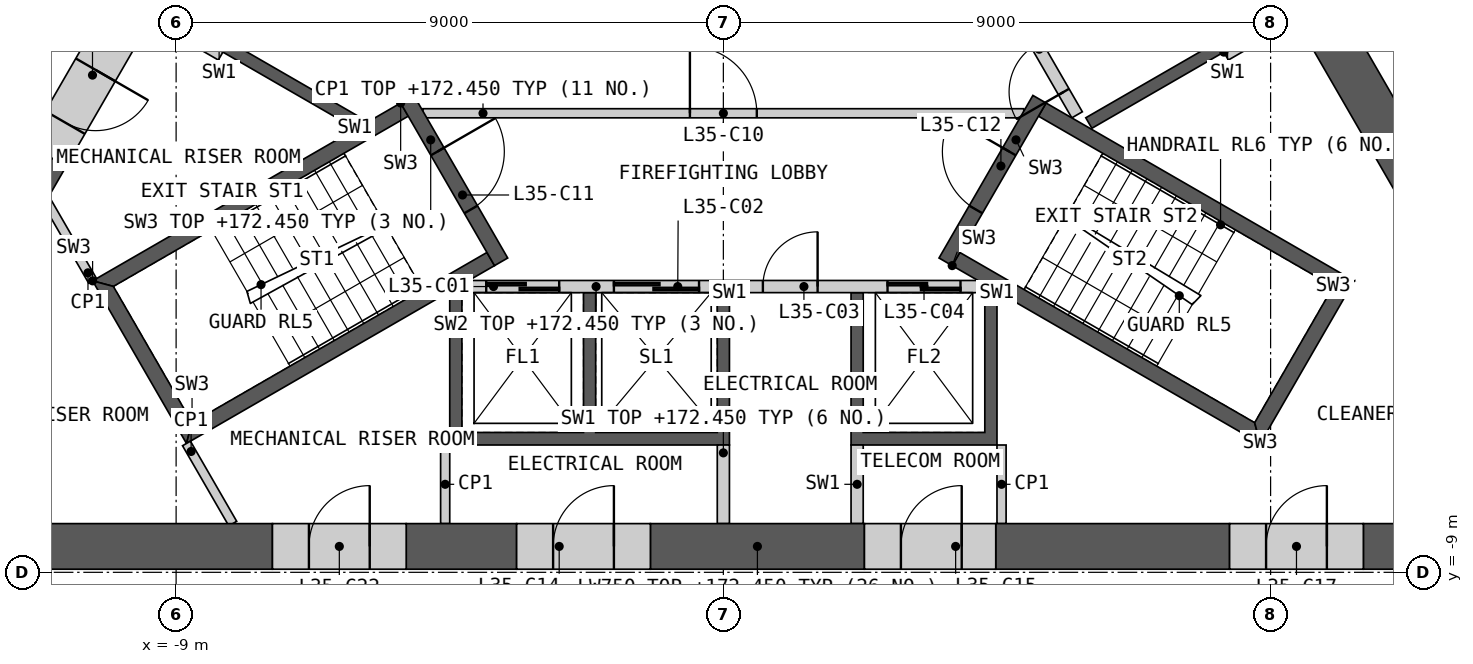
"""IFC4 building model, lengths in metres.
Left out: names, types, materials, properties, quantities, classifications, styles, units other than length and angle.
Written with IfcOpenShell. Run it as: python <this file> out.ifc"""

import sys

from ifc_helpers import new_model, si_unit, direction, frame, frame_2d, origin, place, context, subcontext, project, spatial, polyline, rectangle, outline, extrude, element, fill, save


model = new_model("IFC4")
c1 = context("Model", 3, precision=1e-05, world=origin(), true_north=direction((0.0, 1.0)))
c2 = subcontext(c1, "Body", "Model", "MODEL_VIEW")
j1 = project(units=[si_unit("LENGTHUNIT", "METRE"), si_unit("PLANEANGLEUNIT", "RADIAN")], contexts=[c1])
p1 = place(None, origin())
s1 = spatial("IfcSite", under=j1, at=p1, CompositionType="ELEMENT")
p2 = place(p1, origin())
s2 = spatial("IfcBuilding", under=s1, at=p2, CompositionType="ELEMENT")
p3 = place(p2, frame((0.0, 0.0, 169.2)))
s3 = spatial("IfcBuildingStorey", under=s2, at=p3, CompositionType="ELEMENT", Elevation=169.2)
p4 = place(p3, origin())
e1 = element("IfcWall", 1, at=p4, inside=s3, PredefinedType="SHEAR", context=c2, shape_type="SweptSolid", body=[
    extrude(outline(polyline([(4.5, -4.4), (4.5, -6.906), (2.1, -6.906), (2.1, -4.4), (2.3, -4.4), (2.3, -6.7), (4.3, -6.7), (4.3, -4.4), (4.5, -4.4)])), origin(), (0.0, 0.0, 1.0), 3.25),
])
p5 = place(p3, origin())
e2 = element("IfcWall", 2, at=p5, inside=s3, PredefinedType="SHEAR", context=c2, shape_type="SweptSolid", body=[
    extrude(outline(polyline([(0.1, -4.4), (0.1, -6.906), (-4.5, -6.906), (-4.5, -4.4), (-4.3, -4.4), (-4.3, -6.7), (-2.3, -6.7), (-2.3, -4.4), (-2.1, -4.4), (-2.1, -6.7), (-0.1, -6.7), (-0.1, -4.4), (0.1, -4.4)])), origin(), (0.0, 0.0, 1.0), 3.25),
])
p6 = place(p3, frame((-4.187, -4.3, 0.0), z_axis=(0.0, 0.0, 1.0), x_axis=(1.0, 0.0, 0.0)))
e3 = element("IfcWall", 3, at=p6, inside=s3, PredefinedType="SOLIDWALL", context=c2, shape_type="SweptSolid", body=[
    extrude(rectangle(XDim=8.373, YDim=0.2, at=frame_2d((4.187, 0.0))), origin(), (0.0, 0.0, 1.0), 3.25),
])
p7 = place(p6, frame((0.287, 0.0, 0.0)))
e4 = element("IfcOpeningElement", 4, at=p7, cuts=e3, PredefinedType="OPENING", context=c2, shape_type="SweptSolid", body=[
    extrude(rectangle(XDim=1.2, YDim=2.1, at=frame_2d((0.6, 1.05))), frame((0.0, 0.11, 0.0), z_axis=(0.0, -1.0, 0.0), x_axis=(1.0, 0.0, 0.0)), (0.0, 0.0, 1.0), 0.22),
])
p8 = place(p6, frame((2.387, 0.0, 0.0)))
e5 = element("IfcOpeningElement", 5, at=p8, cuts=e3, PredefinedType="OPENING", context=c2, shape_type="SweptSolid", body=[
    extrude(rectangle(XDim=1.4, YDim=2.1, at=frame_2d((0.7, 1.05))), frame((0.0, 0.11, 0.0), z_axis=(0.0, -1.0, 0.0), x_axis=(1.0, 0.0, 0.0)), (0.0, 0.0, 1.0), 0.22),
])
p9 = place(p6, frame((4.837, 0.0, 0.0)))
e6 = element("IfcOpeningElement", 6, at=p9, cuts=e3, PredefinedType="OPENING", context=c2, shape_type="SweptSolid", body=[
    extrude(rectangle(XDim=0.9, YDim=2.1, at=frame_2d((0.45, 1.05))), frame((0.0, 0.11, 0.0), z_axis=(0.0, -1.0, 0.0), x_axis=(1.0, 0.0, 0.0)), (0.0, 0.0, 1.0), 0.22),
])
p10 = place(p6, frame((6.887, 0.0, 0.0)))
e7 = element("IfcOpeningElement", 7, at=p10, cuts=e3, PredefinedType="OPENING", context=c2, shape_type="SweptSolid", body=[
    extrude(rectangle(XDim=1.2, YDim=2.1, at=frame_2d((0.6, 1.05))), frame((0.0, 0.11, 0.0), z_axis=(0.0, -1.0, 0.0), x_axis=(1.0, 0.0, 0.0)), (0.0, 0.0, 1.0), 0.22),
])
for number, where, z_axis, x_axis in (
    (8, (0.0, -6.906, 0.0), (0.0, 0.0, 1.0), (0.0, -1.0, 0.0)),
    (9, (2.2, -6.906, 0.0), (0.0, 0.0, 1.0), (0.0, -1.0, 0.0)),
):
    element("IfcWall", number, at=place(p3, frame(where, z_axis=z_axis, x_axis=x_axis)), inside=s3, PredefinedType="SHEAR", context=c2, shape_type="SweptSolid", body=[
        extrude(rectangle(XDim=1.293, YDim=0.2, at=frame_2d((0.646, 0.0))), origin(), (0.0, 0.0, 1.0), 3.25),
    ])
p11 = place(p3, origin())
e10 = element("IfcWall", 10, at=p11, inside=s3, PredefinedType="SHEAR", context=c2, shape_type="SweptSolid", body=[
    extrude(outline(polyline([(8.231, -0.444), (6.061, -1.697), (5.96, -1.524), (8.131, -0.271), (8.231, -0.444)])), origin(), (0.0, 0.0, 1.0), 3.25),
])
p12 = place(p3, frame((5.817, -1.476, 0.0), z_axis=(0.0, 0.0, 1.0), x_axis=(-0.500002616675, 0.866023893041, 0.0)))
e11 = element("IfcWall", 11, at=p12, inside=s3, PredefinedType="SOLIDWALL", context=c2, shape_type="SweptSolid", body=[
    extrude(rectangle(XDim=8.373, YDim=0.2, at=frame_2d((4.187, 0.0))), origin(), (0.0, 0.0, 1.0), 3.25),
])
p13 = place(p12, frame((0.437, 0.0, 0.0)))
e12 = element("IfcOpeningElement", 12, at=p13, cuts=e11, PredefinedType="OPENING", context=c2, shape_type="SweptSolid", body=[
    extrude(rectangle(XDim=0.9, YDim=2.1, at=frame_2d((0.45, 1.05))), frame((0.0, 0.11, 0.0), z_axis=(0.0, -1.0, 0.0), x_axis=(1.0, 0.0, 0.0)), (0.0, 0.0, 1.0), 0.22),
])
p14 = place(p12, frame((3.737, 0.0, 0.0)))
e13 = element("IfcOpeningElement", 13, at=p14, cuts=e11, PredefinedType="OPENING", context=c2, shape_type="SweptSolid", body=[
    extrude(rectangle(XDim=0.9, YDim=2.1, at=frame_2d((0.45, 1.05))), frame((0.0, 0.11, 0.0), z_axis=(0.0, -1.0, 0.0), x_axis=(1.0, 0.0, 0.0)), (0.0, 0.0, 1.0), 0.22),
])
p15 = place(p12, frame((6.937, 0.0, 0.0)))
e14 = element("IfcOpeningElement", 14, at=p15, cuts=e11, PredefinedType="OPENING", context=c2, shape_type="SweptSolid", body=[
    extrude(rectangle(XDim=1.1, YDim=2.1, at=frame_2d((0.55, 1.05))), frame((0.0, 0.11, 0.0), z_axis=(0.0, -1.0, 0.0), x_axis=(1.0, 0.0, 0.0)), (0.0, 0.0, 1.0), 0.22),
])
p16 = place(p3, origin())
e15 = element("IfcWall", 15, at=p16, inside=s3, PredefinedType="SHEAR", context=c2, shape_type="SweptSolid", body=[
    extrude(outline(polyline([(-6.061, -1.697), (-8.231, -0.444), (-8.131, -0.271), (-5.96, -1.524), (-6.061, -1.697)])), origin(), (0.0, 0.0, 1.0), 3.25),
])
p17 = place(p3, frame((-4.941, -1.45, 0.0), z_axis=(0.0, 0.0, 1.0), x_axis=(1.0, 0.0, 0.0)))
e16 = element("IfcWall", 16, at=p17, inside=s3, PredefinedType="PARTITIONING", context=c2, shape_type="SweptSolid", body=[
    extrude(rectangle(XDim=9.882, YDim=0.15, at=frame_2d((4.941, 0.0))), origin(), (0.0, 0.0, 1.0), 3.25),
])
p18 = place(p17, frame((4.391, 0.0, 0.0)))
e17 = element("IfcOpeningElement", 17, at=p18, cuts=e16, PredefinedType="OPENING", context=c2, shape_type="SweptSolid", body=[
    extrude(rectangle(XDim=1.1, YDim=2.1, at=frame_2d((0.55, 1.05))), frame((0.0, 0.085, 0.0), z_axis=(0.0, -1.0, 0.0), x_axis=(1.0, 0.0, 0.0)), (0.0, 0.0, 1.0), 0.17),
])
p19 = place(p3, origin())
e18 = element("IfcWall", 18, at=p19, inside=s3, PredefinedType="SHEAR", context=c2, shape_type="SweptSolid", body=[
    extrude(outline(polyline([(-5.307, -1.281), (-10.374, -4.206), (-10.032, -4.298), (-5.182, -1.498), (-5.307, -1.281)])), origin(), (0.0, 0.0, 1.0), 3.25),
])
p20 = place(p3, origin())
e19 = element("IfcWall", 19, at=p20, inside=s3, PredefinedType="SHEAR", context=c2, shape_type="SweptSolid", body=[
    extrude(outline(polyline([(-10.374, -4.206), (-8.83, -6.881), (-8.738, -6.539), (-10.032, -4.298), (-10.374, -4.206)])), origin(), (0.0, 0.0, 1.0), 3.25),
])
p21 = place(p3, origin())
e20 = element("IfcWall", 20, at=p21, inside=s3, PredefinedType="SHEAR", context=c2, shape_type="SweptSolid", body=[
    extrude(outline(polyline([(-8.738, -6.539), (-8.83, -6.881), (-3.763, -3.956), (-3.888, -3.739), (-8.738, -6.539)])), origin(), (0.0, 0.0, 1.0), 3.25),
])
p22 = place(p3, frame((-5.199, -1.219, 0.0), z_axis=(0.0, 0.0, 1.0), x_axis=(0.499982516597, -0.866035497597, 0.0)))
e21 = element("IfcWall", 21, at=p22, inside=s3, PredefinedType="SHEAR", context=c2, shape_type="SweptSolid", body=[
    extrude(rectangle(XDim=3.088, YDim=0.25, at=frame_2d((1.544, 0.0))), origin(), (0.0, 0.0, 1.0), 3.25),
])
p23 = place(p22, frame((0.994, 0.0, 0.0)))
e22 = element("IfcOpeningElement", 22, at=p23, cuts=e21, PredefinedType="OPENING", context=c2, shape_type="SweptSolid", body=[
    extrude(rectangle(XDim=1.1, YDim=2.1, at=frame_2d((0.55, 1.05))), frame((0.0, 0.135, 0.0), z_axis=(0.0, -1.0, 0.0), x_axis=(1.0, 0.0, 0.0)), (0.0, 0.0, 1.0), 0.27),
])
p24 = place(p3, origin())
e23 = element("IfcWall", 23, at=p24, inside=s3, PredefinedType="SHEAR", context=c2, shape_type="SweptSolid", body=[
    extrude(outline(polyline([(3.763, -3.956), (8.83, -6.881), (8.738, -6.539), (3.888, -3.739), (3.763, -3.956)])), origin(), (0.0, 0.0, 1.0), 3.25),
])
p25 = place(p3, origin())
e24 = element("IfcWall", 24, at=p25, inside=s3, PredefinedType="SHEAR", context=c2, shape_type="SweptSolid", body=[
    extrude(outline(polyline([(8.83, -6.881), (10.374, -4.206), (10.032, -4.298), (8.738, -6.539), (8.83, -6.881)])), origin(), (0.0, 0.0, 1.0), 3.25),
])
p26 = place(p3, origin())
e25 = element("IfcWall", 25, at=p26, inside=s3, PredefinedType="SHEAR", context=c2, shape_type="SweptSolid", body=[
    extrude(outline(polyline([(10.032, -4.298), (10.374, -4.206), (5.307, -1.281), (5.182, -1.498), (10.032, -4.298)])), origin(), (0.0, 0.0, 1.0), 3.25),
])
p27 = place(p3, frame((3.655, -3.893, 0.0), z_axis=(0.0, 0.0, 1.0), x_axis=(0.499982516597, 0.866035497597, 0.0)))
e26 = element("IfcWall", 26, at=p27, inside=s3, PredefinedType="SHEAR", context=c2, shape_type="SweptSolid", body=[
    extrude(rectangle(XDim=3.088, YDim=0.25, at=frame_2d((1.544, 0.0))), origin(), (0.0, 0.0, 1.0), 3.25),
])
p28 = place(p27, frame((0.994, 0.0, 0.0)))
e27 = element("IfcOpeningElement", 27, at=p28, cuts=e26, PredefinedType="OPENING", context=c2, shape_type="SweptSolid", body=[
    extrude(rectangle(XDim=1.1, YDim=2.1, at=frame_2d((0.55, 1.05))), frame((0.0, 0.135, 0.0), z_axis=(0.0, -1.0, 0.0), x_axis=(1.0, 0.0, 0.0)), (0.0, 0.0, 1.0), 0.27),
])
for number, where, z_axis, x_axis in (
    (28, (4.575, -6.906, 0.0), (0.0, 0.0, 1.0), (0.0, -1.0, 0.0)),
    (29, (-4.575, -6.906, 0.0), (0.0, 0.0, 1.0), (0.0, -1.0, 0.0)),
    (30, (8.268, -0.509, 0.0), (0.0, 0.0, 1.0), (0.866, 0.5, 0.0)),
    (31, (-8.268, -0.509, 0.0), (0.0, 0.0, 1.0), (-0.866, 0.5, 0.0)),
):
    element("IfcWall", number, at=place(p3, frame(where, z_axis=z_axis, x_axis=x_axis)), inside=s3, PredefinedType="PARTITIONING", context=c2, shape_type="SweptSolid", body=[
        extrude(rectangle(XDim=1.293, YDim=0.15, at=frame_2d((0.646, 0.0))), origin(), (0.0, 0.0, 1.0), 3.25),
    ])
for number, where, z_axis, x_axis in (
    (32, (-8.83, -6.881, 0.0), (0.0, 0.0, 1.0), (0.5, -0.866, 0.0)),
    (33, (-10.374, -4.206, 0.0), (0.0, 0.0, 1.0), (-0.5, 0.866, 0.0)),
):
    element("IfcWall", number, at=place(p3, frame(where, z_axis=z_axis, x_axis=x_axis)), inside=s3, PredefinedType="PARTITIONING", context=c2, shape_type="SweptSolid", body=[
        extrude(rectangle(XDim=1.522, YDim=0.15, at=frame_2d((0.761, 0.0))), origin(), (0.0, 0.0, 1.0), 3.25),
    ])
p29 = place(p3, frame((-14.201, -8.574, 0.0), z_axis=(0.0, 0.0, 1.0), x_axis=(1.0, 0.0, 0.0)))
e34 = element("IfcWall", 34, at=p29, inside=s3, PredefinedType="SHEAR", context=c2, shape_type="SweptSolid", body=[
    extrude(rectangle(XDim=6.785, YDim=0.75, at=frame_2d((3.393, 0.0))), origin(), (0.0, 0.0, 1.0), 3.25),
])
p30 = place(p3, frame((4.48, -8.574, 0.0), z_axis=(0.0, 0.0, 1.0), x_axis=(1.0, 0.0, 0.0)))
e35 = element("IfcWall", 35, at=p30, inside=s3, PredefinedType="SHEAR", context=c2, shape_type="SweptSolid", body=[
    extrude(rectangle(XDim=3.845, YDim=0.75, at=frame_2d((1.923, 0.0))), origin(), (0.0, 0.0, 1.0), 3.25),
])
p31 = place(p3, frame((10.525, -8.574, 0.0), z_axis=(0.0, 0.0, 1.0), x_axis=(1.0, 0.0, 0.0)))
e36 = element("IfcWall", 36, at=p31, inside=s3, PredefinedType="SHEAR", context=c2, shape_type="SweptSolid", body=[
    extrude(rectangle(XDim=3.676, YDim=0.75, at=frame_2d((1.838, 0.0))), origin(), (0.0, 0.0, 1.0), 3.25),
])
p32 = place(p3, frame((-1.2, -8.574, 0.0), z_axis=(0.0, 0.0, 1.0), x_axis=(1.0, 0.0, 0.0)))
e37 = element("IfcWall", 37, at=p32, inside=s3, PredefinedType="SHEAR", context=c2, shape_type="SweptSolid", body=[
    extrude(rectangle(XDim=3.52, YDim=0.75, at=frame_2d((1.76, 0.0))), origin(), (0.0, 0.0, 1.0), 3.25),
])
p33 = place(p3, frame((-5.216, -8.574, 0.0), z_axis=(0.0, 0.0, 1.0), x_axis=(1.0, 0.0, 0.0)))
e38 = element("IfcWall", 38, at=p33, inside=s3, PredefinedType="SHEAR", context=c2, shape_type="SweptSolid", body=[
    extrude(rectangle(XDim=1.816, YDim=0.75, at=frame_2d((0.908, 0.0))), origin(), (0.0, 0.0, 1.0), 3.25),
])
p34 = place(p3, frame((14.526, -8.011, 0.0), z_axis=(0.0, 0.0, 1.0), x_axis=(-0.499994855372, 0.866028374016, 0.0)))
e39 = element("IfcWall", 39, at=p34, inside=s3, PredefinedType="SHEAR", context=c2, shape_type="SweptSolid", body=[
    extrude(rectangle(XDim=14.301, YDim=0.75, at=frame_2d((7.15, 0.0))), origin(), (0.0, 0.0, 1.0), 3.25),
])
p35 = place(p3, frame((-11.133, -2.135, 0.0), z_axis=(0.0, 0.0, 1.0), x_axis=(-0.499936812382, -0.866061882099, 0.0)))
e40 = element("IfcWall", 40, at=p35, inside=s3, PredefinedType="SHEAR", context=c2, shape_type="SweptSolid", body=[
    extrude(rectangle(XDim=2.662, YDim=0.75, at=frame_2d((1.331, 0.0))), origin(), (0.0, 0.0, 1.0), 3.25),
])
p36 = place(p3, frame((-3.4, -8.574, 0.0), z_axis=(0.0, 0.0, 1.0), x_axis=(1.0, 0.0, 0.0)))
e41 = element("IfcWall", 41, at=p36, inside=s3, PredefinedType="SHEAR", context=c2, shape_type="SweptSolid", body=[
    extrude(rectangle(XDim=2.2, YDim=0.75, at=frame_2d((1.1, 0.0))), origin(), (0.0, 0.0, 1.0), 3.25),
])
p37 = place(p36, frame((0.6, 0.0, 0.0)))
e42 = element("IfcOpeningElement", 42, at=p37, cuts=e41, PredefinedType="OPENING", context=c2, shape_type="SweptSolid", body=[
    extrude(rectangle(XDim=1.0, YDim=2.1, at=frame_2d((0.5, 1.05))), frame((0.0, 0.385, 0.0), z_axis=(0.0, -1.0, 0.0), x_axis=(1.0, 0.0, 0.0)), (0.0, 0.0, 1.0), 0.77),
])
p38 = place(p3, frame((2.32, -8.574, 0.0), z_axis=(0.0, 0.0, 1.0), x_axis=(1.0, 0.0, 0.0)))
e43 = element("IfcWall", 43, at=p38, inside=s3, PredefinedType="SHEAR", context=c2, shape_type="SweptSolid", body=[
    extrude(rectangle(XDim=2.16, YDim=0.75, at=frame_2d((1.08, 0.0))), origin(), (0.0, 0.0, 1.0), 3.25),
])
p39 = place(p38, frame((0.6, 0.0, 0.0)))
e44 = element("IfcOpeningElement", 44, at=p39, cuts=e43, PredefinedType="OPENING", context=c2, shape_type="SweptSolid", body=[
    extrude(rectangle(XDim=1.0, YDim=2.1, at=frame_2d((0.5, 1.05))), frame((0.0, 0.385, 0.0), z_axis=(0.0, -1.0, 0.0), x_axis=(1.0, 0.0, 0.0)), (0.0, 0.0, 1.0), 0.77),
])
p40 = place(p3, frame((8.325, -8.574, 0.0), z_axis=(0.0, 0.0, 1.0), x_axis=(1.0, 0.0, 0.0)))
e45 = element("IfcWall", 45, at=p40, inside=s3, PredefinedType="SHEAR", context=c2, shape_type="SweptSolid", body=[
    extrude(rectangle(XDim=2.2, YDim=0.75, at=frame_2d((1.1, 0.0))), origin(), (0.0, 0.0, 1.0), 3.25),
])
p41 = place(p40, frame((0.6, 0.0, 0.0)))
e46 = element("IfcOpeningElement", 46, at=p41, cuts=e45, PredefinedType="OPENING", context=c2, shape_type="SweptSolid", body=[
    extrude(rectangle(XDim=1.0, YDim=2.1, at=frame_2d((0.5, 1.05))), frame((0.0, 0.385, 0.0), z_axis=(0.0, -1.0, 0.0), x_axis=(1.0, 0.0, 0.0)), (0.0, 0.0, 1.0), 0.77),
])
p42 = place(p3, frame((-9.625, 0.477, 0.0), z_axis=(0.0, 0.0, 1.0), x_axis=(-0.499995718215, -0.86602787586, 0.0)))
e47 = element("IfcWall", 47, at=p42, inside=s3, PredefinedType="SHEAR", context=c2, shape_type="SweptSolid", body=[
    extrude(rectangle(XDim=3.016, YDim=0.75, at=frame_2d((1.508, 0.0))), origin(), (0.0, 0.0, 1.0), 3.25),
])
p43 = place(p42, frame((1.4, 0.0, 0.0)))
e48 = element("IfcOpeningElement", 48, at=p43, cuts=e47, PredefinedType="OPENING", context=c2, shape_type="SweptSolid", body=[
    extrude(rectangle(XDim=1.0, YDim=2.1, at=frame_2d((0.5, 1.05))), frame((0.0, 0.385, 0.0), z_axis=(0.0, -1.0, 0.0), x_axis=(1.0, 0.0, 0.0)), (0.0, 0.0, 1.0), 0.77),
])
p44 = place(p3, frame((-7.416, -8.574, 0.0), z_axis=(0.0, 0.0, 1.0), x_axis=(1.0, 0.0, 0.0)))
e49 = element("IfcWall", 49, at=p44, inside=s3, PredefinedType="SHEAR", context=c2, shape_type="SweptSolid", body=[
    extrude(rectangle(XDim=2.2, YDim=0.75, at=frame_2d((1.1, 0.0))), origin(), (0.0, 0.0, 1.0), 3.25),
])
p45 = place(p44, frame((0.6, 0.0, 0.0)))
e50 = element("IfcOpeningElement", 50, at=p45, cuts=e49, PredefinedType="OPENING", context=c2, shape_type="SweptSolid", body=[
    extrude(rectangle(XDim=1.0, YDim=2.1, at=frame_2d((0.5, 1.05))), frame((0.0, 0.385, 0.0), z_axis=(0.0, -1.0, 0.0), x_axis=(1.0, 0.0, 0.0)), (0.0, 0.0, 1.0), 0.77),
])
p46 = place(p3, frame((-14.619, -2.624, 0.0), z_axis=(0.0, 0.0, 1.0), x_axis=(0.50000393355, 0.866023132736, 0.0)))
e51 = element("IfcWall", 51, at=p46, inside=s3, PredefinedType="PARTITIONING", context=c2, shape_type="SweptSolid", body=[
    extrude(rectangle(XDim=9.335, YDim=0.2, at=frame_2d((4.667, 0.0))), origin(), (0.0, 0.0, 1.0), 3.25),
])
p47 = place(p46, frame((3.163, 0.0, 0.0)))
e52 = element("IfcOpeningElement", 52, at=p47, cuts=e51, PredefinedType="OPENING", context=c2, shape_type="SweptSolid", body=[
    extrude(rectangle(XDim=1.0, YDim=2.1, at=frame_2d((0.5, 1.05))), frame((0.0, 0.11, 0.0), z_axis=(0.0, -1.0, 0.0), x_axis=(1.0, 0.0, 0.0)), (0.0, 0.0, 1.0), 0.22),
])
p48 = place(p7, origin())
e53 = element("IfcDoor", 53, at=p48, inside=s3, OperationType="SLIDING_TO_LEFT", PredefinedType="DOOR", context=c2, shape_type="SweptSolid", body=[
    extrude(rectangle(XDim=1.2, YDim=2.1, at=frame_2d((0.6, 1.05))), frame((0.0, 0.025, 0.0), z_axis=(0.0, -1.0, 0.0), x_axis=(1.0, 0.0, 0.0)), (0.0, 0.0, 1.0), 0.05),
])
fill(e4, e53)
p49 = place(p8, origin())
e54 = element("IfcDoor", 54, at=p49, inside=s3, OperationType="SLIDING_TO_LEFT", PredefinedType="DOOR", context=c2, shape_type="SweptSolid", body=[
    extrude(rectangle(XDim=1.4, YDim=2.1, at=frame_2d((0.7, 1.05))), frame((0.0, 0.025, 0.0), z_axis=(0.0, -1.0, 0.0), x_axis=(1.0, 0.0, 0.0)), (0.0, 0.0, 1.0), 0.05),
])
fill(e5, e54)
p50 = place(p9, origin())
e55 = element("IfcDoor", 55, at=p50, inside=s3, OperationType="SINGLE_SWING_RIGHT", PredefinedType="DOOR", context=c2, shape_type="SweptSolid", body=[
    extrude(rectangle(XDim=0.9, YDim=2.1, at=frame_2d((0.45, 1.05))), frame((0.0, 0.025, 0.0), z_axis=(0.0, -1.0, 0.0), x_axis=(1.0, 0.0, 0.0)), (0.0, 0.0, 1.0), 0.05),
])
fill(e6, e55)
p51 = place(p10, origin())
e56 = element("IfcDoor", 56, at=p51, inside=s3, OperationType="SLIDING_TO_LEFT", PredefinedType="DOOR", context=c2, shape_type="SweptSolid", body=[
    extrude(rectangle(XDim=1.2, YDim=2.1, at=frame_2d((0.6, 1.05))), frame((0.0, 0.025, 0.0), z_axis=(0.0, -1.0, 0.0), x_axis=(1.0, 0.0, 0.0)), (0.0, 0.0, 1.0), 0.05),
])
fill(e7, e56)
p52 = place(p13, origin())
e57 = element("IfcDoor", 57, at=p52, inside=s3, OperationType="SINGLE_SWING_LEFT", PredefinedType="DOOR", context=c2, shape_type="SweptSolid", body=[
    extrude(rectangle(XDim=0.9, YDim=2.1, at=frame_2d((0.45, 1.05))), frame((0.0, 0.025, 0.0), z_axis=(0.0, -1.0, 0.0), x_axis=(1.0, 0.0, 0.0)), (0.0, 0.0, 1.0), 0.05),
])
fill(e12, e57)
p53 = place(p18, origin())
e58 = element("IfcDoor", 58, at=p53, inside=s3, OperationType="SINGLE_SWING_LEFT", PredefinedType="DOOR", context=c2, shape_type="SweptSolid", body=[
    extrude(rectangle(XDim=1.1, YDim=2.1, at=frame_2d((0.55, 1.05))), frame((0.0, 0.025, 0.0), z_axis=(0.0, -1.0, 0.0), x_axis=(1.0, 0.0, 0.0)), (0.0, 0.0, 1.0), 0.05),
])
fill(e17, e58)
p54 = place(p23, origin())
e59 = element("IfcDoor", 59, at=p54, inside=s3, OperationType="SINGLE_SWING_LEFT", PredefinedType="DOOR", context=c2, shape_type="SweptSolid", body=[
    extrude(rectangle(XDim=1.1, YDim=2.1, at=frame_2d((0.55, 1.05))), frame((0.0, 0.025, 0.0), z_axis=(0.0, -1.0, 0.0), x_axis=(1.0, 0.0, 0.0)), (0.0, 0.0, 1.0), 0.05),
])
fill(e22, e59)
p55 = place(p28, origin())
e60 = element("IfcDoor", 60, at=p55, inside=s3, OperationType="SINGLE_SWING_RIGHT", PredefinedType="DOOR", context=c2, shape_type="SweptSolid", body=[
    extrude(rectangle(XDim=1.1, YDim=2.1, at=frame_2d((0.55, 1.05))), frame((0.0, 0.025, 0.0), z_axis=(0.0, -1.0, 0.0), x_axis=(1.0, 0.0, 0.0)), (0.0, 0.0, 1.0), 0.05),
])
fill(e27, e60)
p56 = place(p37, origin())
e61 = element("IfcDoor", 61, at=p56, inside=s3, OperationType="SINGLE_SWING_RIGHT", PredefinedType="DOOR", context=c2, shape_type="SweptSolid", body=[
    extrude(rectangle(XDim=1.0, YDim=2.1, at=frame_2d((0.5, 1.05))), frame((0.0, 0.13, 0.0), z_axis=(0.0, -1.0, 0.0), x_axis=(1.0, 0.0, 0.0)), (0.0, 0.0, 1.0), 0.05),
])
fill(e42, e61)
p57 = place(p39, origin())
e62 = element("IfcDoor", 62, at=p57, inside=s3, OperationType="SINGLE_SWING_RIGHT", PredefinedType="DOOR", context=c2, shape_type="SweptSolid", body=[
    extrude(rectangle(XDim=1.0, YDim=2.1, at=frame_2d((0.5, 1.05))), frame((0.0, 0.13, 0.0), z_axis=(0.0, -1.0, 0.0), x_axis=(1.0, 0.0, 0.0)), (0.0, 0.0, 1.0), 0.05),
])
fill(e44, e62)
p58 = place(p41, origin())
e63 = element("IfcDoor", 63, at=p58, inside=s3, OperationType="SINGLE_SWING_RIGHT", PredefinedType="DOOR", context=c2, shape_type="SweptSolid", body=[
    extrude(rectangle(XDim=1.0, YDim=2.1, at=frame_2d((0.5, 1.05))), frame((0.0, 0.13, 0.0), z_axis=(0.0, -1.0, 0.0), x_axis=(1.0, 0.0, 0.0)), (0.0, 0.0, 1.0), 0.05),
])
fill(e46, e63)
p59 = place(p43, origin())
e64 = element("IfcDoor", 64, at=p59, inside=s3, OperationType="SINGLE_SWING_LEFT", PredefinedType="DOOR", context=c2, shape_type="SweptSolid", body=[
    extrude(rectangle(XDim=1.0, YDim=2.1, at=frame_2d((0.5, 1.05))), frame((0.0, 0.13, 0.0), z_axis=(0.0, -1.0, 0.0), x_axis=(1.0, 0.0, 0.0)), (0.0, 0.0, 1.0), 0.05),
])
fill(e48, e64)
p60 = place(p45, origin())
e65 = element("IfcDoor", 65, at=p60, inside=s3, OperationType="SINGLE_SWING_RIGHT", PredefinedType="DOOR", context=c2, shape_type="SweptSolid", body=[
    extrude(rectangle(XDim=1.0, YDim=2.1, at=frame_2d((0.5, 1.05))), frame((0.0, 0.13, 0.0), z_axis=(0.0, -1.0, 0.0), x_axis=(1.0, 0.0, 0.0)), (0.0, 0.0, 1.0), 0.05),
])
fill(e50, e65)
save(model, sys.argv[1])
